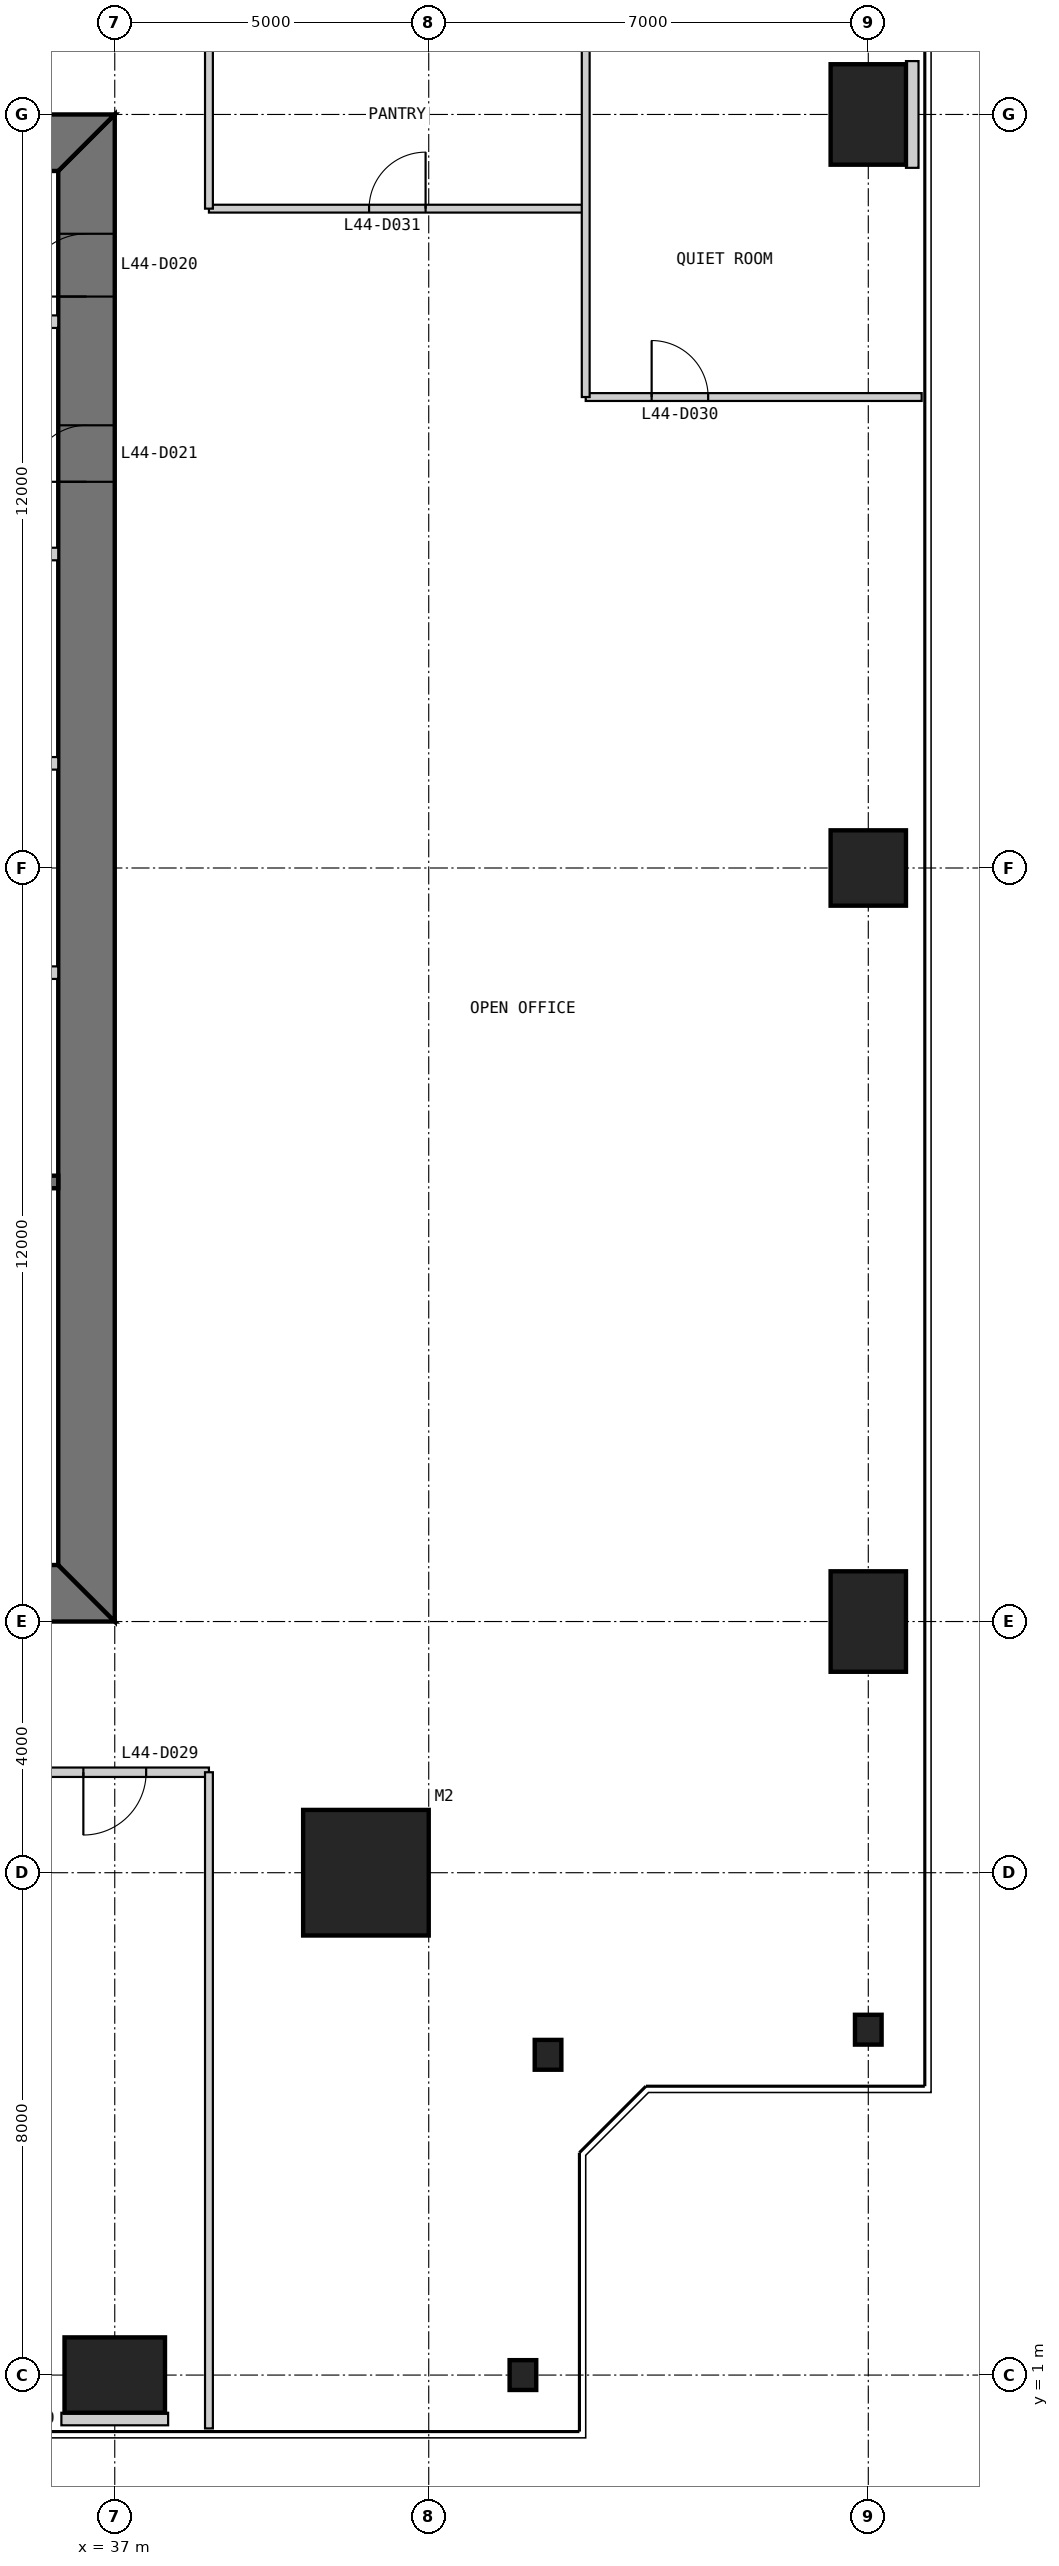
"""IFC4 building model, lengths in metres.
Left out: names, types, materials, properties, quantities, classifications, styles, units other than length and angle.
Written with IfcOpenShell. Run it as: python <this file> out.ifc"""

import sys

from ifc_helpers import new_model, si_unit, direction, frame, frame_2d, origin, origin_2d, place, context, subcontext, project, spatial, polyline, rectangle, i_section, outline, extrude, element, fill, save


model = new_model("IFC4")
c1 = context("Model", 3, precision=1e-05, world=origin(), true_north=direction((0.0, 1.0)))
c2 = subcontext(c1, "Body", "Model", "MODEL_VIEW")
j1 = project(units=[si_unit("LENGTHUNIT", "METRE"), si_unit("PLANEANGLEUNIT", "RADIAN")], contexts=[c1])
p1 = place(None, origin())
s1 = spatial("IfcSite", under=j1, at=p1, CompositionType="ELEMENT")
p2 = place(p1, origin())
s2 = spatial("IfcBuilding", under=s1, at=p2, CompositionType="ELEMENT")
p3 = place(p2, frame((0.0, 0.0, 189.8)))
s3 = spatial("IfcBuildingStorey", under=s2, at=p3, CompositionType="ELEMENT", Elevation=189.8)
p4 = place(p3, frame((41.0, 9.0, 0.0), z_axis=(0.0, 0.0, 1.0), x_axis=(1.0, 0.0, 0.0)))
e1 = element("IfcColumn", 1, at=p4, inside=s3, PredefinedType="COLUMN", context=c2, shape_type="SweptSolid", body=[
    extrude(rectangle(XDim=2.0, YDim=2.0, at=origin_2d()), origin(), (0.0, 0.0, 1.0), 4.0),
])
p5 = place(p3, frame((37.0, 1.0, 0.0), z_axis=(0.0, 0.0, 1.0), x_axis=(1.0, 0.0, 0.0)))
e2 = element("IfcColumn", 2, at=p5, inside=s3, PredefinedType="COLUMN", context=c2, shape_type="SweptSolid", body=[
    extrude(rectangle(XDim=1.6, YDim=1.2, at=origin_2d()), origin(), (0.0, 0.0, 1.0), 4.0),
])
for number, where, z_axis, x_axis in (
    (3, (43.5, 1.0, 0.0), (0.0, 0.0, 1.0), (1.0, 0.0, 0.0)),
    (4, (43.9, 6.1, 0.0), (0.0, 0.0, 1.0), (1.0, 0.0, 0.0)),
    (5, (49.0, 6.5, 0.0), (0.0, 0.0, 1.0), (1.0, 0.0, 0.0)),
):
    element("IfcColumn", number, at=place(p3, frame(where, z_axis=z_axis, x_axis=x_axis)), inside=s3, PredefinedType="COLUMN", context=c2, shape_type="SweptSolid", body=[
        extrude(i_section(OverallWidth=0.424, OverallDepth=0.475, WebThickness=0.048, FlangeThickness=0.077, at=origin_2d()), origin(), (0.0, 0.0, 1.0), 4.0),
    ])
p6 = place(p3, frame((49.0, 13.0, 0.0), z_axis=(0.0, 0.0, 1.0), x_axis=(1.0, 0.0, 0.0)))
e6 = element("IfcColumn", 6, at=p6, inside=s3, PredefinedType="COLUMN", context=c2, shape_type="SweptSolid", body=[
    extrude(rectangle(XDim=1.2, YDim=1.6, at=origin_2d()), origin(), (0.0, 0.0, 1.0), 4.0),
])
p7 = place(p3, frame((49.0, 25.0, 0.0), z_axis=(0.0, 0.0, 1.0), x_axis=(1.0, 0.0, 0.0)))
e7 = element("IfcColumn", 7, at=p7, inside=s3, PredefinedType="COLUMN", context=c2, shape_type="SweptSolid", body=[
    extrude(rectangle(XDim=1.2, YDim=1.2, at=origin_2d()), origin(), (0.0, 0.0, 1.0), 4.0),
])
p8 = place(p3, frame((49.0, 37.0, 0.0), z_axis=(0.0, 0.0, 1.0), x_axis=(1.0, 0.0, 0.0)))
e8 = element("IfcColumn", 8, at=p8, inside=s3, PredefinedType="COLUMN", context=c2, shape_type="SweptSolid", body=[
    extrude(rectangle(XDim=1.2, YDim=1.6, at=origin_2d()), origin(), (0.0, 0.0, 1.0), 4.0),
])
p9 = place(p3, frame((13.0, 13.45, 0.0), z_axis=(0.0, 0.0, 1.0), x_axis=(1.0, 0.0, 0.0)))
e9 = element("IfcWall", 9, at=p9, inside=s3, PredefinedType="SHEAR", context=c2, shape_type="SweptSolid", body=[
    extrude(outline(polyline([(0.0, -0.45), (24.0, -0.45), (23.1, 0.45), (0.9, 0.45), (0.0, -0.45)])), origin(), (0.0, 0.0, 1.0), 4.0),
])
p10 = place(p9, frame((4.9, 0.0, 0.0)))
e10 = element("IfcOpeningElement", 10, at=p10, cuts=e9, PredefinedType="OPENING", context=c2, shape_type="SweptSolid", body=[
    extrude(rectangle(XDim=1.0, YDim=2.2, at=frame_2d((0.5, 1.1))), frame((0.0, 0.46, 0.0), z_axis=(0.0, -1.0, 0.0), x_axis=(1.0, 0.0, 0.0)), (0.0, 0.0, 1.0), 0.92),
])
p11 = place(p9, frame((8.9, 0.0, 0.0)))
e11 = element("IfcOpeningElement", 11, at=p11, cuts=e9, PredefinedType="OPENING", context=c2, shape_type="SweptSolid", body=[
    extrude(rectangle(XDim=1.1, YDim=2.2, at=frame_2d((0.55, 1.1))), frame((0.0, 0.46, 0.0), z_axis=(0.0, -1.0, 0.0), x_axis=(1.0, 0.0, 0.0)), (0.0, 0.0, 1.0), 0.92),
])
p12 = place(p9, frame((15.05, 0.0, 0.0)))
e12 = element("IfcOpeningElement", 12, at=p12, cuts=e9, PredefinedType="OPENING", context=c2, shape_type="SweptSolid", body=[
    extrude(rectangle(XDim=0.9, YDim=2.2, at=frame_2d((0.45, 1.1))), frame((0.0, 0.46, 0.0), z_axis=(0.0, -1.0, 0.0), x_axis=(1.0, 0.0, 0.0)), (0.0, 0.0, 1.0), 0.92),
])
p13 = place(p9, frame((17.9, 0.0, 0.0)))
e13 = element("IfcOpeningElement", 13, at=p13, cuts=e9, PredefinedType="OPENING", context=c2, shape_type="SweptSolid", body=[
    extrude(rectangle(XDim=1.0, YDim=2.2, at=frame_2d((0.5, 1.1))), frame((0.0, 0.46, 0.0), z_axis=(0.0, -1.0, 0.0), x_axis=(1.0, 0.0, 0.0)), (0.0, 0.0, 1.0), 0.92),
])
p14 = place(p9, frame((21.4, 0.0, 0.0)))
e14 = element("IfcOpeningElement", 14, at=p14, cuts=e9, PredefinedType="OPENING", context=c2, shape_type="SweptSolid", body=[
    extrude(rectangle(XDim=1.0, YDim=2.2, at=frame_2d((0.5, 1.1))), frame((0.0, 0.46, 0.0), z_axis=(0.0, -1.0, 0.0), x_axis=(1.0, 0.0, 0.0)), (0.0, 0.0, 1.0), 0.92),
])
p15 = place(p3, frame((36.55, 13.9, 0.0), z_axis=(0.0, 0.0, 1.0), x_axis=(0.0, 1.0, 0.0)))
e15 = element("IfcWall", 15, at=p15, inside=s3, PredefinedType="SHEAR", context=c2, shape_type="SweptSolid", body=[
    extrude(outline(polyline([(-0.9, -0.45), (23.1, -0.45), (22.2, 0.45), (0.0, 0.45), (-0.9, -0.45)])), origin(), (0.0, 0.0, 1.0), 4.0),
])
p16 = place(p15, frame((20.2, 0.0, 0.0)))
e16 = element("IfcOpeningElement", 16, at=p16, cuts=e15, PredefinedType="OPENING", context=c2, shape_type="SweptSolid", body=[
    extrude(rectangle(XDim=1.0, YDim=2.2, at=frame_2d((0.5, 1.1))), frame((0.0, 0.46, 0.0), z_axis=(0.0, -1.0, 0.0), x_axis=(1.0, 0.0, 0.0)), (0.0, 0.0, 1.0), 0.92),
])
p17 = place(p15, frame((17.25, 0.0, 0.0)))
e17 = element("IfcOpeningElement", 17, at=p17, cuts=e15, PredefinedType="OPENING", context=c2, shape_type="SweptSolid", body=[
    extrude(rectangle(XDim=0.9, YDim=2.2, at=frame_2d((0.45, 1.1))), frame((0.0, 0.46, 0.0), z_axis=(0.0, -1.0, 0.0), x_axis=(1.0, 0.0, 0.0)), (0.0, 0.0, 1.0), 0.92),
])
p18 = place(p3, frame((37.0, 36.55, 0.0), z_axis=(0.0, 0.0, 1.0), x_axis=(-1.0, 0.0, 0.0)))
e18 = element("IfcWall", 18, at=p18, inside=s3, PredefinedType="SHEAR", context=c2, shape_type="SweptSolid", body=[
    extrude(outline(polyline([(0.0, -0.45), (24.0, -0.45), (23.1, 0.45), (0.9, 0.45), (0.0, -0.45)])), origin(), (0.0, 0.0, 1.0), 4.0),
])
p19 = place(p18, frame((4.9, 0.0, 0.0)))
e19 = element("IfcOpeningElement", 19, at=p19, cuts=e18, PredefinedType="OPENING", context=c2, shape_type="SweptSolid", body=[
    extrude(rectangle(XDim=1.0, YDim=2.2, at=frame_2d((0.5, 1.1))), frame((0.0, 0.46, 0.0), z_axis=(0.0, -1.0, 0.0), x_axis=(1.0, 0.0, 0.0)), (0.0, 0.0, 1.0), 0.92),
])
p20 = place(p18, frame((8.9, 0.0, 0.0)))
e20 = element("IfcOpeningElement", 20, at=p20, cuts=e18, PredefinedType="OPENING", context=c2, shape_type="SweptSolid", body=[
    extrude(rectangle(XDim=1.1, YDim=2.2, at=frame_2d((0.55, 1.1))), frame((0.0, 0.46, 0.0), z_axis=(0.0, -1.0, 0.0), x_axis=(1.0, 0.0, 0.0)), (0.0, 0.0, 1.0), 0.92),
])
p21 = place(p18, frame((15.05, 0.0, 0.0)))
e21 = element("IfcOpeningElement", 21, at=p21, cuts=e18, PredefinedType="OPENING", context=c2, shape_type="SweptSolid", body=[
    extrude(rectangle(XDim=0.9, YDim=2.2, at=frame_2d((0.45, 1.1))), frame((0.0, 0.46, 0.0), z_axis=(0.0, -1.0, 0.0), x_axis=(1.0, 0.0, 0.0)), (0.0, 0.0, 1.0), 0.92),
])
p22 = place(p18, frame((17.9, 0.0, 0.0)))
e22 = element("IfcOpeningElement", 22, at=p22, cuts=e18, PredefinedType="OPENING", context=c2, shape_type="SweptSolid", body=[
    extrude(rectangle(XDim=1.0, YDim=2.2, at=frame_2d((0.5, 1.1))), frame((0.0, 0.46, 0.0), z_axis=(0.0, -1.0, 0.0), x_axis=(1.0, 0.0, 0.0)), (0.0, 0.0, 1.0), 0.92),
])
p23 = place(p18, frame((21.4, 0.0, 0.0)))
e23 = element("IfcOpeningElement", 23, at=p23, cuts=e18, PredefinedType="OPENING", context=c2, shape_type="SweptSolid", body=[
    extrude(rectangle(XDim=1.0, YDim=2.2, at=frame_2d((0.5, 1.1))), frame((0.0, 0.46, 0.0), z_axis=(0.0, -1.0, 0.0), x_axis=(1.0, 0.0, 0.0)), (0.0, 0.0, 1.0), 0.92),
])
p24 = place(p3, frame((20.3, 20.0, 0.0), z_axis=(0.0, 0.0, 1.0), x_axis=(1.0, 0.0, 0.0)))
e24 = element("IfcWall", 24, at=p24, inside=s3, PredefinedType="SOLIDWALL", context=c2, shape_type="SweptSolid", body=[
    extrude(rectangle(XDim=15.8, YDim=0.2, at=frame_2d((7.9, 0.0))), origin(), (0.0, 0.0, 1.0), 3.8),
])
for number, where, z_axis, x_axis in (
    (25, (36.1, 30.0, 0.0), (0.0, 0.0, 1.0), (-1.0, 0.0, 0.0)),
    (26, (36.1, 26.667, 0.0), (0.0, 0.0, 1.0), (-1.0, 0.0, 0.0)),
    (27, (36.1, 23.333, 0.0), (0.0, 0.0, 1.0), (-1.0, 0.0, 0.0)),
    (28, (36.1, 33.7, 0.0), (0.0, 0.0, 1.0), (-1.0, 0.0, 0.0)),
):
    element("IfcWall", number, at=place(p3, frame(where, z_axis=z_axis, x_axis=x_axis)), inside=s3, PredefinedType="PARTITIONING", context=c2, shape_type="SweptSolid", body=[
        extrude(rectangle(XDim=2.8, YDim=0.2, at=frame_2d((1.4, 0.0))), origin(), (0.0, 0.0, 1.0), 3.8),
    ])
p25 = place(p3, frame((11.5, 10.6, 0.0), z_axis=(0.0, 0.0, 1.0), x_axis=(1.0, 0.0, 0.0)))
e29 = element("IfcWall", 29, at=p25, inside=s3, PredefinedType="PARTITIONING", context=c2, shape_type="SweptSolid", body=[
    extrude(rectangle(XDim=27.0, YDim=0.15, at=frame_2d((13.5, 0.0))), origin(), (0.0, 0.0, 1.0), 3.85),
])
p26 = place(p25, frame((12.25, 0.0, 0.0)))
e30 = element("IfcOpeningElement", 30, at=p26, cuts=e29, PredefinedType="OPENING", context=c2, shape_type="SweptSolid", body=[
    extrude(rectangle(XDim=1.0, YDim=2.2, at=frame_2d((0.5, 1.1))), frame((0.0, 0.085, 0.0), z_axis=(0.0, -1.0, 0.0), x_axis=(1.0, 0.0, 0.0)), (0.0, 0.0, 1.0), 0.17),
])
p27 = place(p25, frame((19.75, 0.0, 0.0)))
e31 = element("IfcOpeningElement", 31, at=p27, cuts=e29, PredefinedType="OPENING", context=c2, shape_type="SweptSolid", body=[
    extrude(rectangle(XDim=1.0, YDim=2.2, at=frame_2d((0.5, 1.1))), frame((0.0, 0.085, 0.0), z_axis=(0.0, -1.0, 0.0), x_axis=(1.0, 0.0, 0.0)), (0.0, 0.0, 1.0), 0.17),
])
p28 = place(p25, frame((0.25, 0.0, 0.0)))
e32 = element("IfcOpeningElement", 32, at=p28, cuts=e29, PredefinedType="OPENING", context=c2, shape_type="SweptSolid", body=[
    extrude(rectangle(XDim=1.0, YDim=2.2, at=frame_2d((0.5, 1.1))), frame((0.0, 0.085, 0.0), z_axis=(0.0, -1.0, 0.0), x_axis=(1.0, 0.0, 0.0)), (0.0, 0.0, 1.0), 0.17),
])
p29 = place(p25, frame((10.75, 0.0, 0.0)))
e33 = element("IfcOpeningElement", 33, at=p29, cuts=e29, PredefinedType="OPENING", context=c2, shape_type="SweptSolid", body=[
    extrude(rectangle(XDim=1.0, YDim=2.2, at=frame_2d((0.5, 1.1))), frame((0.0, 0.085, 0.0), z_axis=(0.0, -1.0, 0.0), x_axis=(1.0, 0.0, 0.0)), (0.0, 0.0, 1.0), 0.17),
])
p30 = place(p25, frame((22.0, 0.0, 0.0)))
e34 = element("IfcOpeningElement", 34, at=p30, cuts=e29, PredefinedType="OPENING", context=c2, shape_type="SweptSolid", body=[
    extrude(rectangle(XDim=1.0, YDim=2.2, at=frame_2d((0.5, 1.1))), frame((0.0, 0.085, 0.0), z_axis=(0.0, -1.0, 0.0), x_axis=(1.0, 0.0, 0.0)), (0.0, 0.0, 1.0), 0.17),
])
p31 = place(p25, frame((25.0, 0.0, 0.0)))
e35 = element("IfcOpeningElement", 35, at=p31, cuts=e29, PredefinedType="OPENING", context=c2, shape_type="SweptSolid", body=[
    extrude(rectangle(XDim=1.0, YDim=2.2, at=frame_2d((0.5, 1.1))), frame((0.0, 0.085, 0.0), z_axis=(0.0, -1.0, 0.0), x_axis=(1.0, 0.0, 0.0)), (0.0, 0.0, 1.0), 0.17),
])
p32 = place(p3, frame((38.5, 0.15, 0.0), z_axis=(0.0, 0.0, 1.0), x_axis=(0.0, 1.0, 0.0)))
e36 = element("IfcWall", 36, at=p32, inside=s3, PredefinedType="PARTITIONING", context=c2, shape_type="SweptSolid", body=[
    extrude(rectangle(XDim=10.45, YDim=0.125, at=frame_2d((5.225, 0.0))), origin(), (0.0, 0.0, 1.0), 3.85),
])
p33 = place(p3, frame((49.85, 32.5, 0.0), z_axis=(0.0, 0.0, 1.0), x_axis=(-1.0, 0.0, 0.0)))
e37 = element("IfcWall", 37, at=p33, inside=s3, PredefinedType="PARTITIONING", context=c2, shape_type="SweptSolid", body=[
    extrude(rectangle(XDim=5.35, YDim=0.125, at=frame_2d((2.675, 0.0))), origin(), (0.0, 0.0, 1.0), 3.85),
])
p34 = place(p33, frame((3.4, 0.0, 0.0)))
e38 = element("IfcOpeningElement", 38, at=p34, cuts=e37, PredefinedType="OPENING", context=c2, shape_type="SweptSolid", body=[
    extrude(rectangle(XDim=0.9, YDim=2.2, at=frame_2d((0.45, 1.1))), frame((0.0, 0.073, 0.0), z_axis=(0.0, -1.0, 0.0), x_axis=(1.0, 0.0, 0.0)), (0.0, 0.0, 1.0), 0.145),
])
p35 = place(p3, frame((44.5, 35.5, 0.0), z_axis=(0.0, 0.0, 1.0), x_axis=(-1.0, 0.0, 0.0)))
e39 = element("IfcWall", 39, at=p35, inside=s3, PredefinedType="PARTITIONING", context=c2, shape_type="SweptSolid", body=[
    extrude(rectangle(XDim=6.0, YDim=0.125, at=frame_2d((3.0, 0.0))), origin(), (0.0, 0.0, 1.0), 3.85),
])
p36 = place(p35, frame((2.55, 0.0, 0.0)))
e40 = element("IfcOpeningElement", 40, at=p36, cuts=e39, PredefinedType="OPENING", context=c2, shape_type="SweptSolid", body=[
    extrude(rectangle(XDim=0.9, YDim=2.2, at=frame_2d((0.45, 1.1))), frame((0.0, 0.073, 0.0), z_axis=(0.0, -1.0, 0.0), x_axis=(1.0, 0.0, 0.0)), (0.0, 0.0, 1.0), 0.145),
])
p37 = place(p3, frame((44.5, 32.5, 0.0), z_axis=(0.0, 0.0, 1.0), x_axis=(0.0, 1.0, 0.0)))
e41 = element("IfcWall", 41, at=p37, inside=s3, PredefinedType="PARTITIONING", context=c2, shape_type="SweptSolid", body=[
    extrude(rectangle(XDim=6.0, YDim=0.125, at=frame_2d((3.0, 0.0))), origin(), (0.0, 0.0, 1.0), 3.85),
])
p38 = place(p3, frame((38.5, 35.5, 0.0), z_axis=(0.0, 0.0, 1.0), x_axis=(0.0, 1.0, 0.0)))
e42 = element("IfcWall", 42, at=p38, inside=s3, PredefinedType="PARTITIONING", context=c2, shape_type="SweptSolid", body=[
    extrude(rectangle(XDim=3.0, YDim=0.125, at=frame_2d((1.5, 0.0))), origin(), (0.0, 0.0, 1.0), 3.85),
])
for number, where, z_axis, x_axis in (
    (43, (37.0, 0.2, 0.0), (0.0, 0.0, 1.0), (0.0, 1.0, 0.0)),
    (44, (49.8, 37.0, 0.0), (0.0, 0.0, 1.0), (-1.0, 0.0, 0.0)),
):
    element("IfcWall", number, at=place(p3, frame(where, z_axis=z_axis, x_axis=x_axis)), inside=s3, PredefinedType="PARTITIONING", context=c2, shape_type="SweptSolid", body=[
        extrude(rectangle(XDim=0.2, YDim=1.7, at=frame_2d((0.1, 0.0))), origin(), (0.0, 0.0, 1.0), 3.85),
    ])
p39 = place(p16, origin())
e45 = element("IfcDoor", 45, at=p39, inside=s3, OperationType="SINGLE_SWING_LEFT", PredefinedType="DOOR", context=c2, shape_type="SweptSolid", body=[
    extrude(rectangle(XDim=1.0, YDim=2.2, at=frame_2d((0.5, 1.1))), frame((0.0, 0.025, 0.0), z_axis=(0.0, -1.0, 0.0), x_axis=(1.0, 0.0, 0.0)), (0.0, 0.0, 1.0), 0.05),
    extrude(outline(polyline([(0.0, 0.0), (0.04, 0.0), (0.04, 2.16), (0.96, 2.16), (0.96, 0.0), (1.0, 0.0), (1.0, 2.2), (0.0, 2.2), (0.0, 0.0)])), frame((0.0, 0.3, 0.0), z_axis=(0.0, -1.0, 0.0), x_axis=(1.0, 0.0, 0.0)), (0.0, 0.0, 1.0), 0.6),
])
fill(e16, e45)
p40 = place(p17, origin())
e46 = element("IfcDoor", 46, at=p40, inside=s3, OperationType="SINGLE_SWING_LEFT", PredefinedType="DOOR", context=c2, shape_type="SweptSolid", body=[
    extrude(rectangle(XDim=0.9, YDim=2.2, at=frame_2d((0.45, 1.1))), frame((0.0, 0.025, 0.0), z_axis=(0.0, -1.0, 0.0), x_axis=(1.0, 0.0, 0.0)), (0.0, 0.0, 1.0), 0.05),
    extrude(outline(polyline([(0.0, 0.0), (0.04, 0.0), (0.04, 2.16), (0.86, 2.16), (0.86, 0.0), (0.9, 0.0), (0.9, 2.2), (0.0, 2.2), (0.0, 0.0)])), frame((0.0, 0.3, 0.0), z_axis=(0.0, -1.0, 0.0), x_axis=(1.0, 0.0, 0.0)), (0.0, 0.0, 1.0), 0.6),
])
fill(e17, e46)
p41 = place(p31, frame((1.0, 0.0, 0.0), z_axis=(0.0, 0.0, 1.0), x_axis=(-1.0, 0.0, 0.0)))
e47 = element("IfcDoor", 47, at=p41, inside=s3, OperationType="SINGLE_SWING_RIGHT", PredefinedType="DOOR", context=c2, shape_type="SweptSolid", body=[
    extrude(rectangle(XDim=1.0, YDim=2.2, at=frame_2d((0.5, 1.1))), frame((0.0, 0.025, 0.0), z_axis=(0.0, -1.0, 0.0), x_axis=(1.0, 0.0, 0.0)), (0.0, 0.0, 1.0), 0.05),
])
fill(e35, e47)
p42 = place(p34, frame((0.9, 0.0, 0.0), z_axis=(0.0, 0.0, 1.0), x_axis=(-1.0, 0.0, 0.0)))
e48 = element("IfcDoor", 48, at=p42, inside=s3, OperationType="SINGLE_SWING_LEFT", PredefinedType="DOOR", context=c2, shape_type="SweptSolid", body=[
    extrude(rectangle(XDim=0.9, YDim=2.2, at=frame_2d((0.45, 1.1))), frame((0.0, 0.025, 0.0), z_axis=(0.0, -1.0, 0.0), x_axis=(1.0, 0.0, 0.0)), (0.0, 0.0, 1.0), 0.05),
])
fill(e38, e48)
p43 = place(p36, frame((0.9, 0.0, 0.0), z_axis=(0.0, 0.0, 1.0), x_axis=(-1.0, 0.0, 0.0)))
e49 = element("IfcDoor", 49, at=p43, inside=s3, OperationType="SINGLE_SWING_RIGHT", PredefinedType="DOOR", context=c2, shape_type="SweptSolid", body=[
    extrude(rectangle(XDim=0.9, YDim=2.2, at=frame_2d((0.45, 1.1))), frame((0.0, 0.025, 0.0), z_axis=(0.0, -1.0, 0.0), x_axis=(1.0, 0.0, 0.0)), (0.0, 0.0, 1.0), 0.05),
])
fill(e40, e49)
save(model, sys.argv[1])
